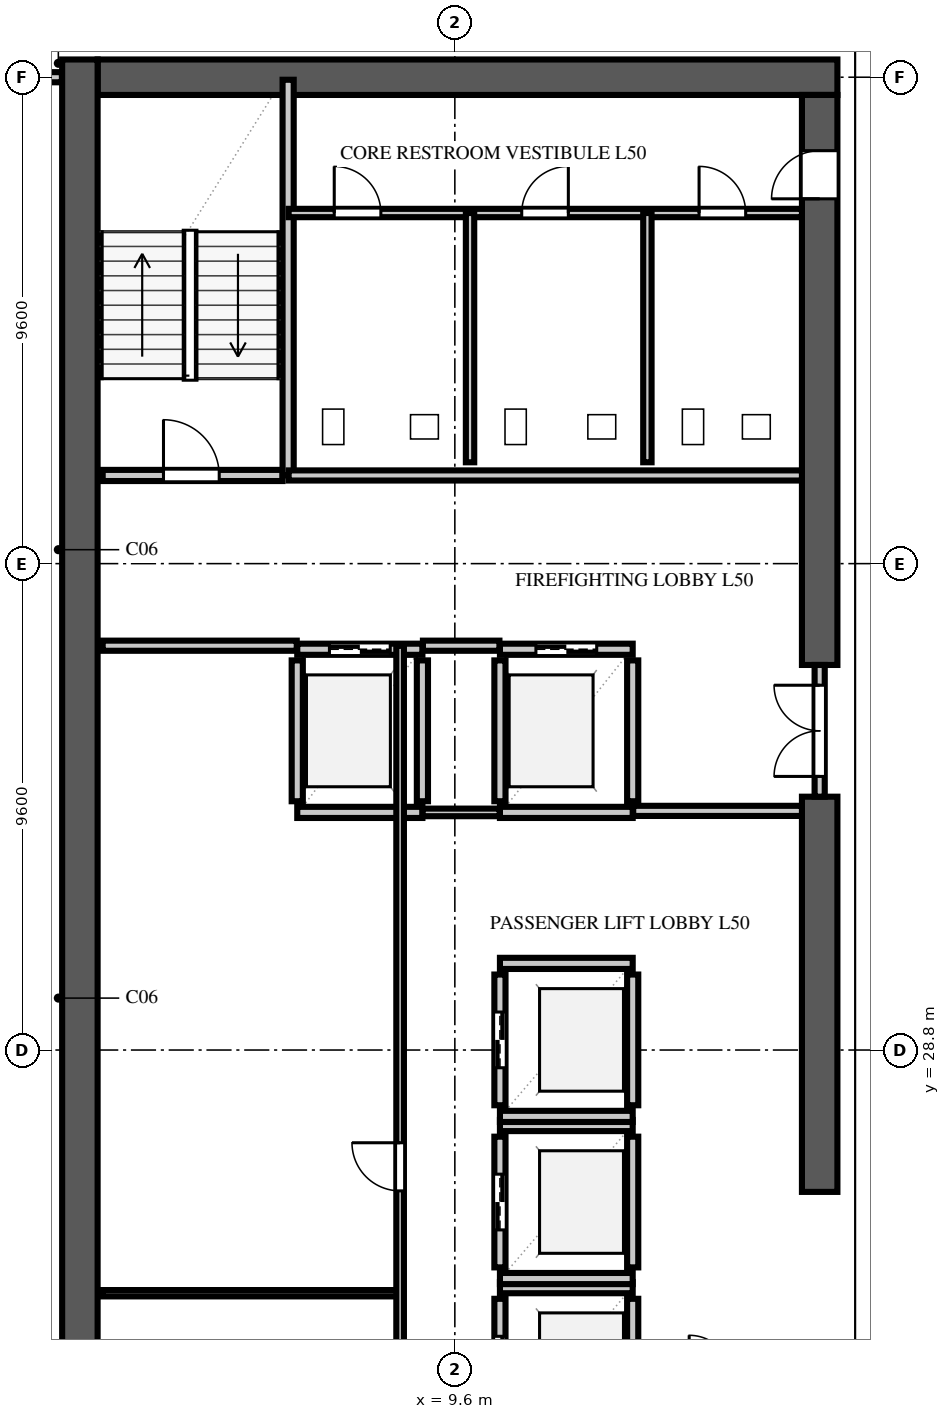
"""IFC4 building model, lengths in metres.
Left out: names, types, materials, properties, quantities, classifications, styles, units other than length and angle.
Written with IfcOpenShell. Run it as: python <this file> out.ifc"""

import sys

from ifc_helpers import new_model, si_unit, direction, frame, frame_2d, origin, place, context, subcontext, project, spatial, rectangle, extrude, element, fill, save


model = new_model("IFC4")
c1 = context("Model", 3, precision=1e-05, world=origin(), true_north=direction((0.0, 1.0)))
c2 = subcontext(c1, "Body", "Model", "MODEL_VIEW")
j1 = project(units=[si_unit("LENGTHUNIT", "METRE"), si_unit("PLANEANGLEUNIT", "RADIAN")], contexts=[c1])
p1 = place(None, origin())
s1 = spatial("IfcSite", under=j1, at=p1, CompositionType="ELEMENT")
p2 = place(p1, origin())
s2 = spatial("IfcBuilding", under=s1, at=p2, CompositionType="ELEMENT")
p3 = place(p2, frame((0.0, 0.0, 199.0)))
s3 = spatial("IfcBuildingStorey", under=s2, at=p3, CompositionType="ELEMENT", Elevation=199.0)
p4 = place(p3, frame((2.55, 48.0, 0.0), z_axis=(0.0, 0.0, 1.0), x_axis=(1.0, 0.0, 0.0)))
e1 = element("IfcWall", 1, at=p4, inside=s3, PredefinedType="SHEAR", context=c2, shape_type="SweptSolid", body=[
    extrude(rectangle(XDim=14.6, YDim=0.7, at=frame_2d((7.3, 0.0))), origin(), (0.0, 0.0, 1.0), 3.54),
])
p5 = place(p3, frame((2.2, 9.25, 0.0), z_axis=(0.0, 0.0, 1.0), x_axis=(0.0, 1.0, 0.0)))
e2 = element("IfcWall", 2, at=p5, inside=s3, PredefinedType="SHEAR", context=c2, shape_type="SweptSolid", body=[
    extrude(rectangle(XDim=39.1, YDim=0.7, at=frame_2d((19.55, 0.0))), origin(), (0.0, 0.0, 1.0), 3.54),
])
p6 = place(p3, frame((16.8, 26.0, 0.0), z_axis=(0.0, 0.0, 1.0), x_axis=(0.0, 1.0, 0.0)))
e3 = element("IfcWall", 3, at=p6, inside=s3, PredefinedType="SHEAR", context=c2, shape_type="SweptSolid", body=[
    extrude(rectangle(XDim=7.8, YDim=0.7, at=frame_2d((3.9, 0.0))), origin(), (0.0, 0.0, 1.0), 3.54),
])
p7 = place(p3, frame((16.8, 36.4, 0.0), z_axis=(0.0, 0.0, 1.0), x_axis=(0.0, 1.0, 0.0)))
e4 = element("IfcWall", 4, at=p7, inside=s3, PredefinedType="SHEAR", context=c2, shape_type="SweptSolid", body=[
    extrude(rectangle(XDim=11.25, YDim=0.7, at=frame_2d((5.625, 0.0))), origin(), (0.0, 0.0, 1.0), 3.54),
])
p8 = place(p7, frame((9.2, 0.0, 0.0)))
e5 = element("IfcOpeningElement", 5, at=p8, cuts=e4, PredefinedType="OPENING", context=c2, shape_type="SweptSolid", body=[
    extrude(rectangle(XDim=0.95, YDim=2.15, at=frame_2d((0.475, 1.075))), frame((0.0, 0.362, 0.0), z_axis=(0.0, -1.0, 0.0), x_axis=(1.0, 0.0, 0.0)), (0.0, 0.0, 1.0), 0.724),
])
p9 = place(p3, frame((2.65, 40.14, 0.0), z_axis=(0.0, 0.0, 1.0), x_axis=(1.0, 0.0, 0.0)))
e6 = element("IfcWall", 6, at=p9, inside=s3, PredefinedType="SOLIDWALL", context=c2, shape_type="SweptSolid", body=[
    extrude(rectangle(XDim=3.55, YDim=0.22, at=frame_2d((1.775, 0.0))), origin(), (0.0, 0.0, 1.0), 3.54),
])
p10 = place(p9, frame((1.2, 0.0, 0.0)))
e7 = element("IfcOpeningElement", 7, at=p10, cuts=e6, PredefinedType="OPENING", context=c2, shape_type="SweptSolid", body=[
    extrude(rectangle(XDim=1.1, YDim=2.2, at=frame_2d((0.55, 1.1))), frame((0.0, 0.122, 0.0), z_axis=(0.0, -1.0, 0.0), x_axis=(1.0, 0.0, 0.0)), (0.0, 0.0, 1.0), 0.244),
])
p11 = place(p3, frame((6.31, 40.14, 0.0), z_axis=(0.0, 0.0, 1.0), x_axis=(0.0, 1.0, 0.0)))
e8 = element("IfcWall", 8, at=p11, inside=s3, PredefinedType="SOLIDWALL", context=c2, shape_type="SweptSolid", body=[
    extrude(rectangle(XDim=7.81, YDim=0.22, at=frame_2d((3.905, 0.0))), origin(), (0.0, 0.0, 1.0), 3.54),
])
p12 = place(p3, frame((10.49, 21.31, 0.0), z_axis=(0.0, 0.0, 1.0), x_axis=(0.0, 1.0, 0.0)))
e9 = element("IfcWall", 9, at=p12, inside=s3, PredefinedType="SOLIDWALL", context=c2, shape_type="SweptSolid", body=[
    extrude(rectangle(XDim=2.58, YDim=0.22, at=frame_2d((1.29, 0.0))), origin(), (0.0, 0.0, 1.0), 3.54),
])
p13 = place(p12, frame((0.74, 0.0, 0.0)))
e10 = element("IfcOpeningElement", 10, at=p13, cuts=e9, PredefinedType="OPENING", context=c2, shape_type="SweptSolid", body=[
    extrude(rectangle(XDim=1.1, YDim=2.2, at=frame_2d((0.55, 1.1))), frame((0.0, 0.122, 0.0), z_axis=(0.0, -1.0, 0.0), x_axis=(1.0, 0.0, 0.0)), (0.0, 0.0, 1.0), 0.244),
])
p14 = place(p3, frame((13.11, 21.31, 0.0), z_axis=(0.0, 0.0, 1.0), x_axis=(0.0, 1.0, 0.0)))
e11 = element("IfcWall", 11, at=p14, inside=s3, PredefinedType="SOLIDWALL", context=c2, shape_type="SweptSolid", body=[
    extrude(rectangle(XDim=2.58, YDim=0.22, at=frame_2d((1.29, 0.0))), origin(), (0.0, 0.0, 1.0), 3.54),
])
p15 = place(p3, frame((10.49, 24.11, 0.0), z_axis=(0.0, 0.0, 1.0), x_axis=(1.0, 0.0, 0.0)))
e12 = element("IfcWall", 12, at=p15, inside=s3, PredefinedType="SOLIDWALL", context=c2, shape_type="SweptSolid", body=[
    extrude(rectangle(XDim=2.62, YDim=0.22, at=frame_2d((1.31, 0.0))), origin(), (0.0, 0.0, 1.0), 3.54),
])
p16 = place(p3, frame((10.49, 24.51, 0.0), z_axis=(0.0, 0.0, 1.0), x_axis=(0.0, 1.0, 0.0)))
e13 = element("IfcWall", 13, at=p16, inside=s3, PredefinedType="SOLIDWALL", context=c2, shape_type="SweptSolid", body=[
    extrude(rectangle(XDim=2.58, YDim=0.22, at=frame_2d((1.29, 0.0))), origin(), (0.0, 0.0, 1.0), 3.54),
])
p17 = place(p16, frame((0.74, 0.0, 0.0)))
e14 = element("IfcOpeningElement", 14, at=p17, cuts=e13, PredefinedType="OPENING", context=c2, shape_type="SweptSolid", body=[
    extrude(rectangle(XDim=1.1, YDim=2.2, at=frame_2d((0.55, 1.1))), frame((0.0, 0.122, 0.0), z_axis=(0.0, -1.0, 0.0), x_axis=(1.0, 0.0, 0.0)), (0.0, 0.0, 1.0), 0.244),
])
p18 = place(p3, frame((13.11, 24.51, 0.0), z_axis=(0.0, 0.0, 1.0), x_axis=(0.0, 1.0, 0.0)))
e15 = element("IfcWall", 15, at=p18, inside=s3, PredefinedType="SOLIDWALL", context=c2, shape_type="SweptSolid", body=[
    extrude(rectangle(XDim=2.58, YDim=0.22, at=frame_2d((1.29, 0.0))), origin(), (0.0, 0.0, 1.0), 3.54),
])
for number, where, z_axis, x_axis in (
    (16, (10.49, 24.29, 0.0), (0.0, 0.0, 1.0), (1.0, 0.0, 0.0)),
    (17, (10.49, 27.31, 0.0), (0.0, 0.0, 1.0), (1.0, 0.0, 0.0)),
):
    element("IfcWall", number, at=place(p3, frame(where, z_axis=z_axis, x_axis=x_axis)), inside=s3, PredefinedType="SOLIDWALL", context=c2, shape_type="SweptSolid", body=[
        extrude(rectangle(XDim=2.62, YDim=0.22, at=frame_2d((1.31, 0.0))), origin(), (0.0, 0.0, 1.0), 3.54),
    ])
p19 = place(p3, frame((10.49, 27.71, 0.0), z_axis=(0.0, 0.0, 1.0), x_axis=(0.0, 1.0, 0.0)))
e18 = element("IfcWall", 18, at=p19, inside=s3, PredefinedType="SOLIDWALL", context=c2, shape_type="SweptSolid", body=[
    extrude(rectangle(XDim=2.58, YDim=0.22, at=frame_2d((1.29, 0.0))), origin(), (0.0, 0.0, 1.0), 3.54),
])
p20 = place(p19, frame((0.74, 0.0, 0.0)))
e19 = element("IfcOpeningElement", 19, at=p20, cuts=e18, PredefinedType="OPENING", context=c2, shape_type="SweptSolid", body=[
    extrude(rectangle(XDim=1.1, YDim=2.2, at=frame_2d((0.55, 1.1))), frame((0.0, 0.122, 0.0), z_axis=(0.0, -1.0, 0.0), x_axis=(1.0, 0.0, 0.0)), (0.0, 0.0, 1.0), 0.244),
])
p21 = place(p3, frame((13.11, 27.71, 0.0), z_axis=(0.0, 0.0, 1.0), x_axis=(0.0, 1.0, 0.0)))
e20 = element("IfcWall", 20, at=p21, inside=s3, PredefinedType="SOLIDWALL", context=c2, shape_type="SweptSolid", body=[
    extrude(rectangle(XDim=2.58, YDim=0.22, at=frame_2d((1.29, 0.0))), origin(), (0.0, 0.0, 1.0), 3.54),
])
for number, where, z_axis, x_axis in (
    (21, (10.49, 27.49, 0.0), (0.0, 0.0, 1.0), (1.0, 0.0, 0.0)),
    (22, (10.49, 30.51, 0.0), (0.0, 0.0, 1.0), (1.0, 0.0, 0.0)),
):
    element("IfcWall", number, at=place(p3, frame(where, z_axis=z_axis, x_axis=x_axis)), inside=s3, PredefinedType="SOLIDWALL", context=c2, shape_type="SweptSolid", body=[
        extrude(rectangle(XDim=2.62, YDim=0.22, at=frame_2d((1.31, 0.0))), origin(), (0.0, 0.0, 1.0), 3.54),
    ])
for number, where, z_axis, x_axis in (
    (23, (6.49, 33.71, 0.0), (0.0, 0.0, 1.0), (0.0, 1.0, 0.0)),
    (24, (8.96, 33.71, 0.0), (0.0, 0.0, 1.0), (0.0, 1.0, 0.0)),
):
    element("IfcWall", number, at=place(p3, frame(where, z_axis=z_axis, x_axis=x_axis)), inside=s3, PredefinedType="SOLIDWALL", context=c2, shape_type="SweptSolid", body=[
        extrude(rectangle(XDim=2.78, YDim=0.22, at=frame_2d((1.39, 0.0))), origin(), (0.0, 0.0, 1.0), 3.54),
    ])
p22 = place(p3, frame((6.49, 33.49, 0.0), z_axis=(0.0, 0.0, 1.0), x_axis=(1.0, 0.0, 0.0)))
e25 = element("IfcWall", 25, at=p22, inside=s3, PredefinedType="SOLIDWALL", context=c2, shape_type="SweptSolid", body=[
    extrude(rectangle(XDim=2.47, YDim=0.22, at=frame_2d((1.235, 0.0))), origin(), (0.0, 0.0, 1.0), 3.54),
])
p23 = place(p3, frame((6.49, 36.71, 0.0), z_axis=(0.0, 0.0, 1.0), x_axis=(1.0, 0.0, 0.0)))
e26 = element("IfcWall", 26, at=p23, inside=s3, PredefinedType="SOLIDWALL", context=c2, shape_type="SweptSolid", body=[
    extrude(rectangle(XDim=2.47, YDim=0.22, at=frame_2d((1.235, 0.0))), origin(), (0.0, 0.0, 1.0), 3.54),
])
p24 = place(p23, frame((0.635, 0.0, 0.0)))
e27 = element("IfcOpeningElement", 27, at=p24, cuts=e26, PredefinedType="OPENING", context=c2, shape_type="SweptSolid", body=[
    extrude(rectangle(XDim=1.2, YDim=2.2, at=frame_2d((0.6, 1.1))), frame((0.0, 0.122, 0.0), z_axis=(0.0, -1.0, 0.0), x_axis=(1.0, 0.0, 0.0)), (0.0, 0.0, 1.0), 0.244),
])
for number, where, z_axis, x_axis in (
    (28, (10.49, 33.71, 0.0), (0.0, 0.0, 1.0), (0.0, 1.0, 0.0)),
    (29, (13.11, 33.71, 0.0), (0.0, 0.0, 1.0), (0.0, 1.0, 0.0)),
):
    element("IfcWall", number, at=place(p3, frame(where, z_axis=z_axis, x_axis=x_axis)), inside=s3, PredefinedType="SOLIDWALL", context=c2, shape_type="SweptSolid", body=[
        extrude(rectangle(XDim=2.78, YDim=0.22, at=frame_2d((1.39, 0.0))), origin(), (0.0, 0.0, 1.0), 3.54),
    ])
p25 = place(p3, frame((10.49, 33.49, 0.0), z_axis=(0.0, 0.0, 1.0), x_axis=(1.0, 0.0, 0.0)))
e30 = element("IfcWall", 30, at=p25, inside=s3, PredefinedType="SOLIDWALL", context=c2, shape_type="SweptSolid", body=[
    extrude(rectangle(XDim=2.62, YDim=0.22, at=frame_2d((1.31, 0.0))), origin(), (0.0, 0.0, 1.0), 3.54),
])
p26 = place(p3, frame((10.49, 36.71, 0.0), z_axis=(0.0, 0.0, 1.0), x_axis=(1.0, 0.0, 0.0)))
e31 = element("IfcWall", 31, at=p26, inside=s3, PredefinedType="SOLIDWALL", context=c2, shape_type="SweptSolid", body=[
    extrude(rectangle(XDim=2.62, YDim=0.22, at=frame_2d((1.31, 0.0))), origin(), (0.0, 0.0, 1.0), 3.54),
])
p27 = place(p26, frame((0.71, 0.0, 0.0)))
e32 = element("IfcOpeningElement", 32, at=p27, cuts=e31, PredefinedType="OPENING", context=c2, shape_type="SweptSolid", body=[
    extrude(rectangle(XDim=1.2, YDim=2.2, at=frame_2d((0.6, 1.1))), frame((0.0, 0.122, 0.0), z_axis=(0.0, -1.0, 0.0), x_axis=(1.0, 0.0, 0.0)), (0.0, 0.0, 1.0), 0.244),
])
p28 = place(p3, frame((2.65, 36.78, 0.0), z_axis=(0.0, 0.0, 1.0), x_axis=(1.0, 0.0, 0.0)))
e33 = element("IfcWall", 33, at=p28, inside=s3, PredefinedType="SOLIDWALL", context=c2, shape_type="SweptSolid", body=[
    extrude(rectangle(XDim=3.83, YDim=0.2, at=frame_2d((1.915, 0.0))), origin(), (0.0, 0.0, 1.0), 3.54),
])
p29 = place(p3, frame((8.97, 36.78, 0.0), z_axis=(0.0, 0.0, 1.0), x_axis=(1.0, 0.0, 0.0)))
e34 = element("IfcWall", 34, at=p29, inside=s3, PredefinedType="SOLIDWALL", context=c2, shape_type="SweptSolid", body=[
    extrude(rectangle(XDim=1.51, YDim=0.2, at=frame_2d((0.755, 0.0))), origin(), (0.0, 0.0, 1.0), 3.54),
])
p30 = place(p3, frame((13.12, 33.52, 0.0), z_axis=(0.0, 0.0, 1.0), x_axis=(1.0, 0.0, 0.0)))
e35 = element("IfcWall", 35, at=p30, inside=s3, PredefinedType="SOLIDWALL", context=c2, shape_type="SweptSolid", body=[
    extrude(rectangle(XDim=3.33, YDim=0.2, at=frame_2d((1.665, 0.0))), origin(), (0.0, 0.0, 1.0), 3.54),
])
p31 = place(p3, frame((6.32, 40.14, 0.0), z_axis=(0.0, 0.0, 1.0), x_axis=(1.0, 0.0, 0.0)))
e36 = element("IfcWall", 36, at=p31, inside=s3, PredefinedType="SOLIDWALL", context=c2, shape_type="SweptSolid", body=[
    extrude(rectangle(XDim=10.13, YDim=0.2, at=frame_2d((5.065, 0.0))), origin(), (0.0, 0.0, 1.0), 3.54),
])
p32 = place(p3, frame((16.8, 33.8, 0.0), z_axis=(0.0, 0.0, 1.0), x_axis=(0.0, 1.0, 0.0)))
e37 = element("IfcWall", 37, at=p32, inside=s3, PredefinedType="SOLIDWALL", context=c2, shape_type="SweptSolid", body=[
    extrude(rectangle(XDim=2.6, YDim=0.2, at=frame_2d((1.3, 0.0))), origin(), (0.0, 0.0, 1.0), 3.54),
])
p33 = place(p32, frame((0.4, 0.0, 0.0)))
e38 = element("IfcOpeningElement", 38, at=p33, cuts=e37, PredefinedType="OPENING", context=c2, shape_type="SweptSolid", body=[
    extrude(rectangle(XDim=1.8, YDim=2.2, at=frame_2d((0.9, 1.1))), frame((0.0, 0.112, 0.0), z_axis=(0.0, -1.0, 0.0), x_axis=(1.0, 0.0, 0.0)), (0.0, 0.0, 1.0), 0.224),
])
p34 = place(p3, frame((8.965, 33.49, 0.0), z_axis=(0.0, 0.0, 1.0), x_axis=(1.0, 0.0, 0.0)))
e39 = element("IfcWall", 39, at=p34, inside=s3, PredefinedType="PARTITIONING", context=c2, shape_type="SweptSolid", body=[
    extrude(rectangle(XDim=1.52, YDim=0.15, at=frame_2d((0.76, 0.0))), origin(), (0.0, 0.0, 1.0), 3.54),
])
p35 = place(p3, frame((2.65, 24.0, 0.0), z_axis=(0.0, 0.0, 1.0), x_axis=(1.0, 0.0, 0.0)))
e40 = element("IfcWall", 40, at=p35, inside=s3, PredefinedType="PARTITIONING", context=c2, shape_type="SweptSolid", body=[
    extrude(rectangle(XDim=5.87, YDim=0.125, at=frame_2d((2.935, 0.0))), origin(), (0.0, 0.0, 1.0), 3.54),
])
p36 = place(p3, frame((8.52, 12.02, 0.0), z_axis=(0.0, 0.0, 1.0), x_axis=(0.0, 1.0, 0.0)))
e41 = element("IfcWall", 41, at=p36, inside=s3, PredefinedType="PARTITIONING", context=c2, shape_type="SweptSolid", body=[
    extrude(rectangle(XDim=24.76, YDim=0.15, at=frame_2d((12.38, 0.0))), origin(), (0.0, 0.0, 1.0), 3.54),
])
p37 = place(p36, frame((6.0, 0.0, 0.0)))
e42 = element("IfcOpeningElement", 42, at=p37, cuts=e41, PredefinedType="OPENING", context=c2, shape_type="SweptSolid", body=[
    extrude(rectangle(XDim=0.95, YDim=2.15, at=frame_2d((0.475, 1.075))), frame((0.0, 0.087, 0.0), z_axis=(0.0, -1.0, 0.0), x_axis=(1.0, 0.0, 0.0)), (0.0, 0.0, 1.0), 0.174),
])
p38 = place(p36, frame((14.0, 0.0, 0.0)))
e43 = element("IfcOpeningElement", 43, at=p38, cuts=e41, PredefinedType="OPENING", context=c2, shape_type="SweptSolid", body=[
    extrude(rectangle(XDim=0.95, YDim=2.15, at=frame_2d((0.475, 1.075))), frame((0.0, 0.087, 0.0), z_axis=(0.0, -1.0, 0.0), x_axis=(1.0, 0.0, 0.0)), (0.0, 0.0, 1.0), 0.174),
])
p39 = place(p3, frame((6.32, 45.32, 0.0), z_axis=(0.0, 0.0, 1.0), x_axis=(1.0, 0.0, 0.0)))
e44 = element("IfcWall", 44, at=p39, inside=s3, PredefinedType="PLUMBINGWALL", context=c2, shape_type="SweptSolid", body=[
    extrude(rectangle(XDim=10.13, YDim=0.165, at=frame_2d((5.065, 0.0))), origin(), (0.0, 0.0, 1.0), 3.54),
])
p40 = place(p39, frame((0.9, 0.0, 0.0)))
e45 = element("IfcOpeningElement", 45, at=p40, cuts=e44, PredefinedType="OPENING", context=c2, shape_type="SweptSolid", body=[
    extrude(rectangle(XDim=0.92, YDim=2.15, at=frame_2d((0.46, 1.075))), frame((0.0, 0.094, 0.0), z_axis=(0.0, -1.0, 0.0), x_axis=(1.0, 0.0, 0.0)), (0.0, 0.0, 1.0), 0.189),
])
p41 = place(p39, frame((4.6, 0.0, 0.0)))
e46 = element("IfcOpeningElement", 46, at=p41, cuts=e44, PredefinedType="OPENING", context=c2, shape_type="SweptSolid", body=[
    extrude(rectangle(XDim=0.92, YDim=2.15, at=frame_2d((0.46, 1.075))), frame((0.0, 0.094, 0.0), z_axis=(0.0, -1.0, 0.0), x_axis=(1.0, 0.0, 0.0)), (0.0, 0.0, 1.0), 0.189),
])
p42 = place(p39, frame((8.1, 0.0, 0.0)))
e47 = element("IfcOpeningElement", 47, at=p42, cuts=e44, PredefinedType="OPENING", context=c2, shape_type="SweptSolid", body=[
    extrude(rectangle(XDim=0.92, YDim=2.15, at=frame_2d((0.46, 1.075))), frame((0.0, 0.094, 0.0), z_axis=(0.0, -1.0, 0.0), x_axis=(1.0, 0.0, 0.0)), (0.0, 0.0, 1.0), 0.189),
])
for number, where, z_axis, x_axis in (
    (48, (9.9, 40.4, 0.0), (0.0, 0.0, 1.0), (0.0, 1.0, 0.0)),
    (49, (13.4, 40.4, 0.0), (0.0, 0.0, 1.0), (0.0, 1.0, 0.0)),
):
    element("IfcWall", number, at=place(p3, frame(where, z_axis=z_axis, x_axis=x_axis)), inside=s3, PredefinedType="PLUMBINGWALL", context=c2, shape_type="SweptSolid", body=[
        extrude(rectangle(XDim=4.92, YDim=0.165, at=frame_2d((2.46, 0.0))), origin(), (0.0, 0.0, 1.0), 3.54),
    ])
p43 = place(p3, frame((0.85, 48.0, 0.0), z_axis=(0.0, 0.0, 1.0), x_axis=(1.0, 0.0, 0.0)))
e50 = element("IfcWall", 50, at=p43, inside=s3, PredefinedType="SOLIDWALL", context=c2, shape_type="SweptSolid", body=[
    extrude(rectangle(XDim=0.995, YDim=0.2, at=frame_2d((0.498, 0.0))), origin(), (0.0, 0.0, 1.0), 3.54),
])
p44 = place(p10, origin())
e51 = element("IfcDoor", 51, at=p44, inside=s3, OperationType="SINGLE_SWING_LEFT", PredefinedType="DOOR", context=c2, shape_type="SweptSolid", body=[
    extrude(rectangle(XDim=1.1, YDim=2.2, at=frame_2d((0.55, 1.1))), frame((0.0, 0.025, 0.0), z_axis=(0.0, -1.0, 0.0), x_axis=(1.0, 0.0, 0.0)), (0.0, 0.0, 1.0), 0.05),
])
fill(e7, e51)
p45 = place(p13, origin())
e52 = element("IfcDoor", 52, at=p45, inside=s3, OperationType="DOUBLE_DOOR_SLIDING", PredefinedType="DOOR", context=c2, shape_type="SweptSolid", body=[
    extrude(rectangle(XDim=1.1, YDim=2.2, at=frame_2d((0.55, 1.1))), frame((0.0, 0.025, 0.0), z_axis=(0.0, -1.0, 0.0), x_axis=(1.0, 0.0, 0.0)), (0.0, 0.0, 1.0), 0.05),
])
fill(e10, e52)
p46 = place(p17, origin())
e53 = element("IfcDoor", 53, at=p46, inside=s3, OperationType="DOUBLE_DOOR_SLIDING", PredefinedType="DOOR", context=c2, shape_type="SweptSolid", body=[
    extrude(rectangle(XDim=1.1, YDim=2.2, at=frame_2d((0.55, 1.1))), frame((0.0, 0.025, 0.0), z_axis=(0.0, -1.0, 0.0), x_axis=(1.0, 0.0, 0.0)), (0.0, 0.0, 1.0), 0.05),
])
fill(e14, e53)
p47 = place(p20, origin())
e54 = element("IfcDoor", 54, at=p47, inside=s3, OperationType="DOUBLE_DOOR_SLIDING", PredefinedType="DOOR", context=c2, shape_type="SweptSolid", body=[
    extrude(rectangle(XDim=1.1, YDim=2.2, at=frame_2d((0.55, 1.1))), frame((0.0, 0.025, 0.0), z_axis=(0.0, -1.0, 0.0), x_axis=(1.0, 0.0, 0.0)), (0.0, 0.0, 1.0), 0.05),
])
fill(e19, e54)
p48 = place(p24, origin())
e55 = element("IfcDoor", 55, at=p48, inside=s3, OperationType="DOUBLE_DOOR_SLIDING", PredefinedType="DOOR", context=c2, shape_type="SweptSolid", body=[
    extrude(rectangle(XDim=1.2, YDim=2.2, at=frame_2d((0.6, 1.1))), frame((0.0, 0.025, 0.0), z_axis=(0.0, -1.0, 0.0), x_axis=(1.0, 0.0, 0.0)), (0.0, 0.0, 1.0), 0.05),
])
fill(e27, e55)
p49 = place(p27, origin())
e56 = element("IfcDoor", 56, at=p49, inside=s3, OperationType="DOUBLE_DOOR_SLIDING", PredefinedType="DOOR", context=c2, shape_type="SweptSolid", body=[
    extrude(rectangle(XDim=1.2, YDim=2.2, at=frame_2d((0.6, 1.1))), frame((0.0, 0.025, 0.0), z_axis=(0.0, -1.0, 0.0), x_axis=(1.0, 0.0, 0.0)), (0.0, 0.0, 1.0), 0.05),
])
fill(e32, e56)
p50 = place(p8, origin())
e57 = element("IfcDoor", 57, at=p50, inside=s3, OperationType="SINGLE_SWING_LEFT", PredefinedType="DOOR", context=c2, shape_type="SweptSolid", body=[
    extrude(rectangle(XDim=0.95, YDim=2.15, at=frame_2d((0.475, 1.075))), frame((0.0, 0.025, 0.0), z_axis=(0.0, -1.0, 0.0), x_axis=(1.0, 0.0, 0.0)), (0.0, 0.0, 1.0), 0.05),
])
fill(e5, e57)
p51 = place(p33, origin())
e58 = element("IfcDoor", 58, at=p51, inside=s3, OperationType="DOUBLE_DOOR_SINGLE_SWING", PredefinedType="DOOR", context=c2, shape_type="SweptSolid", body=[
    extrude(rectangle(XDim=1.8, YDim=2.2, at=frame_2d((0.9, 1.1))), frame((0.0, 0.025, 0.0), z_axis=(0.0, -1.0, 0.0), x_axis=(1.0, 0.0, 0.0)), (0.0, 0.0, 1.0), 0.05),
])
fill(e38, e58)
p52 = place(p38, origin())
e59 = element("IfcDoor", 59, at=p52, inside=s3, OperationType="SINGLE_SWING_RIGHT", PredefinedType="DOOR", context=c2, shape_type="SweptSolid", body=[
    extrude(rectangle(XDim=0.95, YDim=2.15, at=frame_2d((0.475, 1.075))), frame((0.0, 0.025, 0.0), z_axis=(0.0, -1.0, 0.0), x_axis=(1.0, 0.0, 0.0)), (0.0, 0.0, 1.0), 0.05),
])
fill(e43, e59)
p53 = place(p40, origin())
e60 = element("IfcDoor", 60, at=p53, inside=s3, OperationType="SINGLE_SWING_LEFT", PredefinedType="DOOR", context=c2, shape_type="SweptSolid", body=[
    extrude(rectangle(XDim=0.92, YDim=2.15, at=frame_2d((0.46, 1.075))), frame((0.0, 0.025, 0.0), z_axis=(0.0, -1.0, 0.0), x_axis=(1.0, 0.0, 0.0)), (0.0, 0.0, 1.0), 0.05),
])
fill(e45, e60)
p54 = place(p41, origin())
e61 = element("IfcDoor", 61, at=p54, inside=s3, OperationType="SINGLE_SWING_RIGHT", PredefinedType="DOOR", context=c2, shape_type="SweptSolid", body=[
    extrude(rectangle(XDim=0.92, YDim=2.15, at=frame_2d((0.46, 1.075))), frame((0.0, 0.025, 0.0), z_axis=(0.0, -1.0, 0.0), x_axis=(1.0, 0.0, 0.0)), (0.0, 0.0, 1.0), 0.05),
])
fill(e46, e61)
p55 = place(p42, origin())
e62 = element("IfcDoor", 62, at=p55, inside=s3, OperationType="SINGLE_SWING_LEFT", PredefinedType="DOOR", context=c2, shape_type="SweptSolid", body=[
    extrude(rectangle(XDim=0.92, YDim=2.15, at=frame_2d((0.46, 1.075))), frame((0.0, 0.025, 0.0), z_axis=(0.0, -1.0, 0.0), x_axis=(1.0, 0.0, 0.0)), (0.0, 0.0, 1.0), 0.05),
])
fill(e47, e62)
save(model, sys.argv[1])
